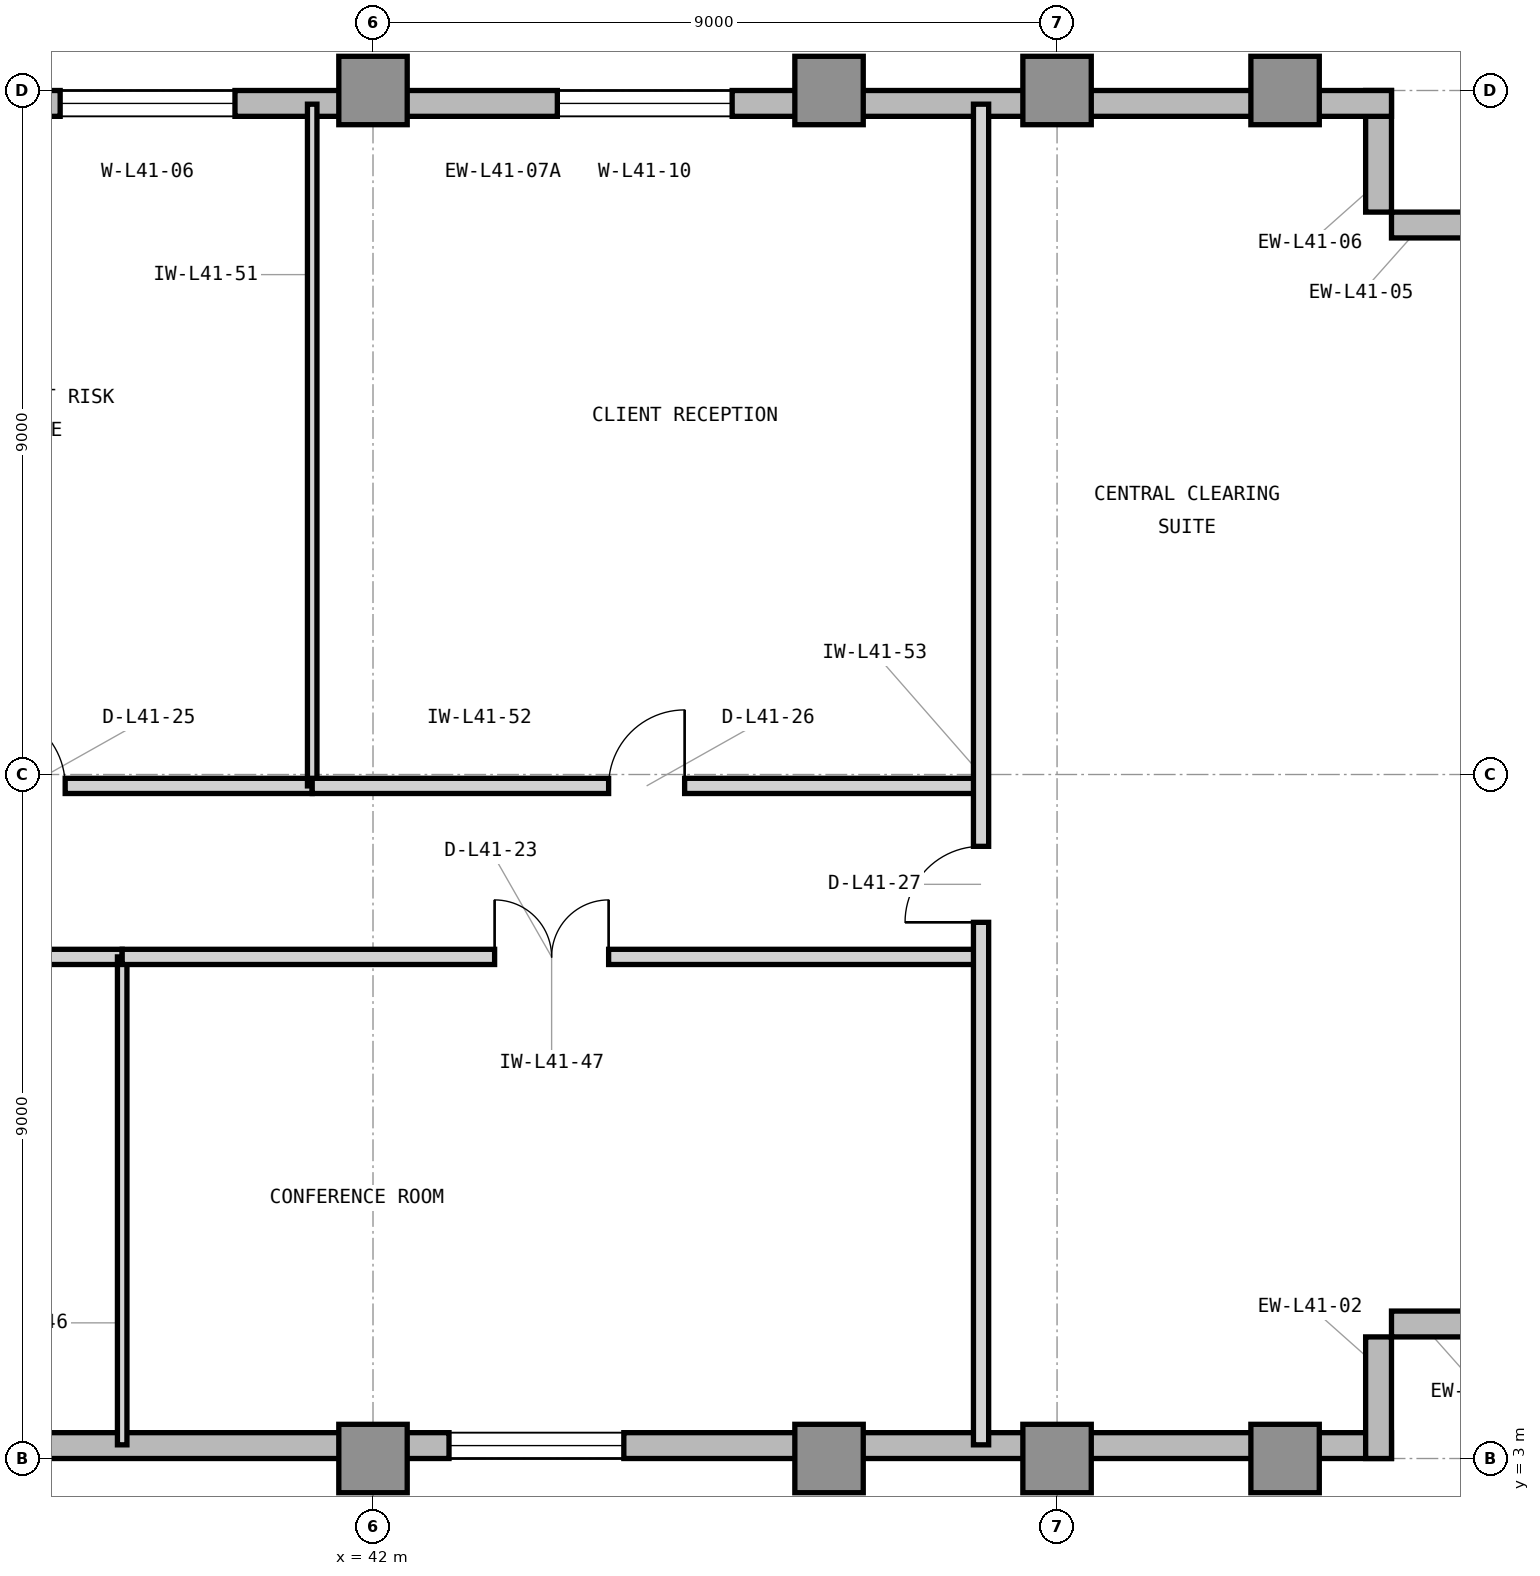
"""IFC4 building model, lengths in metres.
Left out: names, types, materials, properties, quantities, classifications, styles, units other than length and angle.
Written with IfcOpenShell. Run it as: python <this file> out.ifc"""

import sys

from ifc_helpers import new_model, si_unit, direction, frame, frame_2d, origin, origin_2d, place, context, subcontext, project, spatial, rectangle, extrude, element, fill, save


model = new_model("IFC4")
c1 = context("Model", 3, precision=1e-05, world=origin(), true_north=direction((0.0, 1.0)))
c2 = subcontext(c1, "Body", "Model", "MODEL_VIEW")
j1 = project(units=[si_unit("LENGTHUNIT", "METRE"), si_unit("PLANEANGLEUNIT", "RADIAN")], contexts=[c1])
p1 = place(None, origin())
s1 = spatial("IfcSite", under=j1, at=p1, CompositionType="ELEMENT")
p2 = place(p1, origin())
s2 = spatial("IfcBuilding", under=s1, at=p2, CompositionType="ELEMENT")
p3 = place(p2, frame((0.0, 0.0, 172.2)))
s3 = spatial("IfcBuildingStorey", under=s2, at=p3, CompositionType="ELEMENT", Elevation=172.2)
for number, where, z_axis, x_axis in (
    (1, (42.0, 3.0, 0.0), (0.0, 0.0, 1.0), (1.0, 0.0, 0.0)),
    (2, (42.0, 21.0, 0.0), (0.0, 0.0, 1.0), (1.0, 0.0, 0.0)),
    (3, (48.0, 3.0, 0.0), (0.0, 0.0, 1.0), (1.0, 0.0, 0.0)),
    (4, (48.0, 21.0, 0.0), (0.0, 0.0, 1.0), (1.0, 0.0, 0.0)),
    (5, (51.0, 3.0, 0.0), (0.0, 0.0, 1.0), (1.0, 0.0, 0.0)),
    (6, (51.0, 21.0, 0.0), (0.0, 0.0, 1.0), (1.0, 0.0, 0.0)),
    (7, (54.0, 3.0, 0.0), (0.0, 0.0, 1.0), (1.0, 0.0, 0.0)),
    (8, (54.0, 21.0, 0.0), (0.0, 0.0, 1.0), (1.0, 0.0, 0.0)),
):
    element("IfcColumn", number, at=place(p3, frame(where, z_axis=z_axis, x_axis=x_axis)), inside=s3, PredefinedType="COLUMN", context=c2, shape_type="SweptSolid", body=[
        extrude(rectangle(XDim=0.9, YDim=0.9, at=origin_2d()), origin(), (0.0, 0.0, 1.0), 3.9),
    ])
p4 = place(p3, frame((23.9, 3.17, 0.0), z_axis=(0.0, 0.0, 1.0), x_axis=(1.0, 0.0, 0.0)))
e9 = element("IfcWall", 9, at=p4, inside=s3, PredefinedType="STANDARD", context=c2, shape_type="SweptSolid", body=[
    extrude(rectangle(XDim=31.5, YDim=0.34, at=frame_2d((15.75, 0.0))), origin(), (0.0, 0.0, 1.0), 3.7),
])
p5 = place(p4, frame((5.6, 0.0, 0.9)))
e10 = element("IfcOpeningElement", 10, at=p5, cuts=e9, PredefinedType="OPENING", context=c2, shape_type="SweptSolid", body=[
    extrude(rectangle(XDim=2.3, YDim=2.2, at=frame_2d((1.15, 1.1))), frame((0.0, 0.18, 0.0), z_axis=(0.0, -1.0, 0.0), x_axis=(1.0, 0.0, 0.0)), (0.0, 0.0, 1.0), 0.36),
])
p6 = place(p4, frame((10.1, 0.0, 0.9)))
e11 = element("IfcOpeningElement", 11, at=p6, cuts=e9, PredefinedType="OPENING", context=c2, shape_type="SweptSolid", body=[
    extrude(rectangle(XDim=2.3, YDim=2.2, at=frame_2d((1.15, 1.1))), frame((0.0, 0.18, 0.0), z_axis=(0.0, -1.0, 0.0), x_axis=(1.0, 0.0, 0.0)), (0.0, 0.0, 1.0), 0.36),
])
p7 = place(p4, frame((19.1, 0.0, 0.9)))
e12 = element("IfcOpeningElement", 12, at=p7, cuts=e9, PredefinedType="OPENING", context=c2, shape_type="SweptSolid", body=[
    extrude(rectangle(XDim=2.3, YDim=2.2, at=frame_2d((1.15, 1.1))), frame((0.0, 0.18, 0.0), z_axis=(0.0, -1.0, 0.0), x_axis=(1.0, 0.0, 0.0)), (0.0, 0.0, 1.0), 0.36),
])
p8 = place(p4, frame((0.9, 0.0, 0.9)))
e13 = element("IfcOpeningElement", 13, at=p8, cuts=e9, PredefinedType="OPENING", context=c2, shape_type="SweptSolid", body=[
    extrude(rectangle(XDim=1.6, YDim=2.2, at=frame_2d((0.8, 1.1))), frame((0.0, 0.18, 0.0), z_axis=(0.0, -1.0, 0.0), x_axis=(1.0, 0.0, 0.0)), (0.0, 0.0, 1.0), 0.36),
])
for number, where, z_axis, x_axis in (
    (14, (55.23, 3.0, 0.0), (0.0, 0.0, 1.0), (0.0, 1.0, 0.0)),
    (15, (55.4, 4.77, 0.0), (0.0, 0.0, 1.0), (1.0, 0.0, 0.0)),
    (16, (57.0, 19.23, 0.0), (0.0, 0.0, 1.0), (-1.0, 0.0, 0.0)),
    (17, (55.23, 19.4, 0.0), (0.0, 0.0, 1.0), (0.0, 1.0, 0.0)),
):
    element("IfcWall", number, at=place(p3, frame(where, z_axis=z_axis, x_axis=x_axis)), inside=s3, PredefinedType="STANDARD", context=c2, shape_type="SweptSolid", body=[
        extrude(rectangle(XDim=1.6, YDim=0.34, at=frame_2d((0.8, 0.0))), origin(), (0.0, 0.0, 1.0), 3.7),
    ])
p9 = place(p3, frame((55.4, 20.83, 0.0), z_axis=(0.0, 0.0, 1.0), x_axis=(-1.0, 0.0, 0.0)))
e18 = element("IfcWall", 18, at=p9, inside=s3, PredefinedType="STANDARD", context=c2, shape_type="SweptSolid", body=[
    extrude(rectangle(XDim=23.38, YDim=0.34, at=frame_2d((11.69, 0.0))), origin(), (0.0, 0.0, 1.0), 3.7),
])
p10 = place(p9, frame((15.216, 0.0, 0.9)))
e19 = element("IfcOpeningElement", 19, at=p10, cuts=e18, PredefinedType="OPENING", context=c2, shape_type="SweptSolid", body=[
    extrude(rectangle(XDim=2.3, YDim=2.2, at=frame_2d((1.15, 1.1))), frame((0.0, 0.18, 0.0), z_axis=(0.0, -1.0, 0.0), x_axis=(1.0, 0.0, 0.0)), (0.0, 0.0, 1.0), 0.36),
])
p11 = place(p9, frame((8.675, 0.0, 0.9)))
e20 = element("IfcOpeningElement", 20, at=p11, cuts=e18, PredefinedType="OPENING", context=c2, shape_type="SweptSolid", body=[
    extrude(rectangle(XDim=2.3, YDim=2.2, at=frame_2d((1.15, 1.1))), frame((0.0, 0.18, 0.0), z_axis=(0.0, -1.0, 0.0), x_axis=(1.0, 0.0, 0.0)), (0.0, 0.0, 1.0), 0.36),
])
p12 = place(p3, frame((26.7, 9.6, 0.0), z_axis=(0.0, 0.0, 1.0), x_axis=(1.0, 0.0, 0.0)))
e21 = element("IfcWall", 21, at=p12, inside=s3, PredefinedType="PARTITIONING", context=c2, shape_type="SweptSolid", body=[
    extrude(rectangle(XDim=12.0, YDim=0.2, at=frame_2d((6.0, 0.0))), origin(), (0.0, 0.0, 1.0), 3.69),
])
p13 = place(p12, frame((5.5, 0.0, 0.0)))
e22 = element("IfcOpeningElement", 22, at=p13, cuts=e21, PredefinedType="OPENING", context=c2, shape_type="SweptSolid", body=[
    extrude(rectangle(XDim=1.0, YDim=2.15, at=frame_2d((0.5, 1.075))), frame((0.0, 0.11, 0.0), z_axis=(0.0, -1.0, 0.0), x_axis=(1.0, 0.0, 0.0)), (0.0, 0.0, 1.0), 0.22),
])
p14 = place(p3, frame((38.7, 3.18, 0.0), z_axis=(0.0, 0.0, 1.0), x_axis=(0.0, 1.0, 0.0)))
e23 = element("IfcWall", 23, at=p14, inside=s3, PredefinedType="PARTITIONING", context=c2, shape_type="SweptSolid", body=[
    extrude(rectangle(XDim=6.42, YDim=0.125, at=frame_2d((3.21, 0.0))), origin(), (0.0, 0.0, 1.0), 3.69),
])
p15 = place(p3, frame((38.7, 9.6, 0.0), z_axis=(0.0, 0.0, 1.0), x_axis=(1.0, 0.0, 0.0)))
e24 = element("IfcWall", 24, at=p15, inside=s3, PredefinedType="PARTITIONING", context=c2, shape_type="SweptSolid", body=[
    extrude(rectangle(XDim=11.3, YDim=0.2, at=frame_2d((5.65, 0.0))), origin(), (0.0, 0.0, 1.0), 3.69),
])
p16 = place(p15, frame((4.9, 0.0, 0.0)))
e25 = element("IfcOpeningElement", 25, at=p16, cuts=e24, PredefinedType="OPENING", context=c2, shape_type="SweptSolid", body=[
    extrude(rectangle(XDim=1.5, YDim=2.3, at=frame_2d((0.75, 1.15))), frame((0.0, 0.11, 0.0), z_axis=(0.0, -1.0, 0.0), x_axis=(1.0, 0.0, 0.0)), (0.0, 0.0, 1.0), 0.22),
])
p17 = place(p3, frame((33.7, 11.85, 0.0), z_axis=(0.0, 0.0, 1.0), x_axis=(1.0, 0.0, 0.0)))
e26 = element("IfcWall", 26, at=p17, inside=s3, PredefinedType="PARTITIONING", context=c2, shape_type="SweptSolid", body=[
    extrude(rectangle(XDim=7.5, YDim=0.2, at=frame_2d((3.75, 0.0))), origin(), (0.0, 0.0, 1.0), 3.69),
])
p18 = place(p17, frame((3.25, 0.0, 0.0)))
e27 = element("IfcOpeningElement", 27, at=p18, cuts=e26, PredefinedType="OPENING", context=c2, shape_type="SweptSolid", body=[
    extrude(rectangle(XDim=1.0, YDim=2.15, at=frame_2d((0.5, 1.075))), frame((0.0, 0.11, 0.0), z_axis=(0.0, -1.0, 0.0), x_axis=(1.0, 0.0, 0.0)), (0.0, 0.0, 1.0), 0.22),
])
p19 = place(p3, frame((41.2, 11.85, 0.0), z_axis=(0.0, 0.0, 1.0), x_axis=(0.0, 1.0, 0.0)))
e28 = element("IfcWall", 28, at=p19, inside=s3, PredefinedType="PARTITIONING", context=c2, shape_type="SweptSolid", body=[
    extrude(rectangle(XDim=8.97, YDim=0.125, at=frame_2d((4.485, 0.0))), origin(), (0.0, 0.0, 1.0), 3.69),
])
p20 = place(p3, frame((41.2, 11.85, 0.0), z_axis=(0.0, 0.0, 1.0), x_axis=(1.0, 0.0, 0.0)))
e29 = element("IfcWall", 29, at=p20, inside=s3, PredefinedType="PARTITIONING", context=c2, shape_type="SweptSolid", body=[
    extrude(rectangle(XDim=8.8, YDim=0.2, at=frame_2d((4.4, 0.0))), origin(), (0.0, 0.0, 1.0), 3.69),
])
p21 = place(p20, frame((3.9, 0.0, 0.0)))
e30 = element("IfcOpeningElement", 30, at=p21, cuts=e29, PredefinedType="OPENING", context=c2, shape_type="SweptSolid", body=[
    extrude(rectangle(XDim=1.0, YDim=2.15, at=frame_2d((0.5, 1.075))), frame((0.0, 0.11, 0.0), z_axis=(0.0, -1.0, 0.0), x_axis=(1.0, 0.0, 0.0)), (0.0, 0.0, 1.0), 0.22),
])
p22 = place(p3, frame((50.0, 3.18, 0.0), z_axis=(0.0, 0.0, 1.0), x_axis=(0.0, 1.0, 0.0)))
e31 = element("IfcWall", 31, at=p22, inside=s3, PredefinedType="PARTITIONING", context=c2, shape_type="SweptSolid", body=[
    extrude(rectangle(XDim=17.64, YDim=0.2, at=frame_2d((8.82, 0.0))), origin(), (0.0, 0.0, 1.0), 3.69),
])
p23 = place(p22, frame((6.875, 0.0, 0.0)))
e32 = element("IfcOpeningElement", 32, at=p23, cuts=e31, PredefinedType="OPENING", context=c2, shape_type="SweptSolid", body=[
    extrude(rectangle(XDim=1.0, YDim=2.15, at=frame_2d((0.5, 1.075))), frame((0.0, 0.11, 0.0), z_axis=(0.0, -1.0, 0.0), x_axis=(1.0, 0.0, 0.0)), (0.0, 0.0, 1.0), 0.22),
])
p24 = place(p7, origin())
e33 = element("IfcWindow", 33, at=p24, inside=s3, PartitioningType="SINGLE_PANEL", PredefinedType="WINDOW", context=c2, shape_type="SweptSolid", body=[
    extrude(rectangle(XDim=2.3, YDim=2.2, at=frame_2d((1.15, 1.1))), frame((0.0, 0.11, 0.0), z_axis=(0.0, -1.0, 0.0), x_axis=(1.0, 0.0, 0.0)), (0.0, 0.0, 1.0), 0.06),
])
fill(e12, e33)
p25 = place(p10, origin())
e34 = element("IfcWindow", 34, at=p25, inside=s3, PartitioningType="SINGLE_PANEL", PredefinedType="WINDOW", context=c2, shape_type="SweptSolid", body=[
    extrude(rectangle(XDim=2.3, YDim=2.2, at=frame_2d((1.15, 1.1))), frame((0.0, 0.11, 0.0), z_axis=(0.0, -1.0, 0.0), x_axis=(1.0, 0.0, 0.0)), (0.0, 0.0, 1.0), 0.06),
])
fill(e19, e34)
p26 = place(p16, origin())
e35 = element("IfcDoor", 35, at=p26, inside=s3, OperationType="DOUBLE_DOOR_SINGLE_SWING", PredefinedType="DOOR", context=c2, shape_type="SweptSolid", body=[
    extrude(rectangle(XDim=1.5, YDim=2.3, at=frame_2d((0.75, 1.15))), frame((0.0, 0.025, 0.0), z_axis=(0.0, -1.0, 0.0), x_axis=(1.0, 0.0, 0.0)), (0.0, 0.0, 1.0), 0.05),
])
fill(e25, e35)
p27 = place(p18, origin())
e36 = element("IfcDoor", 36, at=p27, inside=s3, OperationType="SINGLE_SWING_LEFT", PredefinedType="DOOR", context=c2, shape_type="SweptSolid", body=[
    extrude(rectangle(XDim=1.0, YDim=2.15, at=frame_2d((0.5, 1.075))), frame((0.0, 0.025, 0.0), z_axis=(0.0, -1.0, 0.0), x_axis=(1.0, 0.0, 0.0)), (0.0, 0.0, 1.0), 0.05),
])
fill(e27, e36)
p28 = place(p21, origin())
e37 = element("IfcDoor", 37, at=p28, inside=s3, OperationType="SINGLE_SWING_RIGHT", PredefinedType="DOOR", context=c2, shape_type="SweptSolid", body=[
    extrude(rectangle(XDim=1.0, YDim=2.15, at=frame_2d((0.5, 1.075))), frame((0.0, 0.025, 0.0), z_axis=(0.0, -1.0, 0.0), x_axis=(1.0, 0.0, 0.0)), (0.0, 0.0, 1.0), 0.05),
])
fill(e30, e37)
p29 = place(p23, origin())
e38 = element("IfcDoor", 38, at=p29, inside=s3, OperationType="SINGLE_SWING_LEFT", PredefinedType="DOOR", context=c2, shape_type="SweptSolid", body=[
    extrude(rectangle(XDim=1.0, YDim=2.15, at=frame_2d((0.5, 1.075))), frame((0.0, 0.025, 0.0), z_axis=(0.0, -1.0, 0.0), x_axis=(1.0, 0.0, 0.0)), (0.0, 0.0, 1.0), 0.05),
])
fill(e32, e38)
p30 = place(p11, origin())
e39 = element("IfcWindow", 39, at=p30, inside=s3, PartitioningType="SINGLE_PANEL", PredefinedType="WINDOW", context=c2, shape_type="SweptSolid", body=[
    extrude(rectangle(XDim=2.3, YDim=2.2, at=frame_2d((1.15, 1.1))), frame((0.0, 0.11, 0.0), z_axis=(0.0, -1.0, 0.0), x_axis=(1.0, 0.0, 0.0)), (0.0, 0.0, 1.0), 0.06),
])
fill(e20, e39)
save(model, sys.argv[1])
